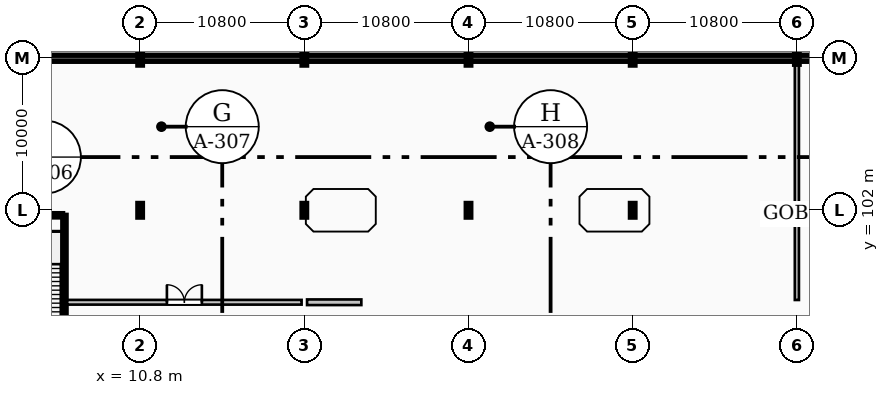
"""IFC4 building model, lengths in metres.
Left out: names, types, materials, properties, quantities, classifications, styles, units other than length and angle.
Written with IfcOpenShell. Run it as: python <this file> out.ifc"""

import sys

from ifc_helpers import new_model, si_unit, direction, frame, frame_2d, origin, origin_2d, place, context, subcontext, project, spatial, rectangle, i_section, extrude, element, fill, save


model = new_model("IFC4")
c1 = context("Model", 3, precision=1e-05, world=origin(), true_north=direction((0.0, 1.0)))
c2 = subcontext(c1, "Body", "Model", "MODEL_VIEW")
j1 = project(units=[si_unit("LENGTHUNIT", "METRE"), si_unit("PLANEANGLEUNIT", "RADIAN")], contexts=[c1])
p1 = place(None, origin())
s1 = spatial("IfcSite", under=j1, at=p1, CompositionType="ELEMENT")
p2 = place(p1, origin())
s2 = spatial("IfcBuilding", under=s1, at=p2, CompositionType="ELEMENT")
p3 = place(p2, origin())
s3 = spatial("IfcBuildingStorey", under=s2, at=p3, CompositionType="ELEMENT", Elevation=0.0)
p4 = place(p3, frame((-0.22, 112.0, 0.0), z_axis=(0.0, 0.0, 1.0), x_axis=(1.0, 0.0, 0.0)))
e1 = element("IfcWall", 1, at=p4, inside=s3, PredefinedType="USERDEFINED", context=c2, shape_type="SweptSolid", body=[
    extrude(rectangle(XDim=32.62, YDim=0.4, at=frame_2d((16.31, 0.0))), origin(), (0.0, 0.0, 1.0), 4.56),
])
p5 = place(p3, frame((32.4, 112.0, 0.0), z_axis=(0.0, 0.0, 1.0), x_axis=(1.0, 0.0, 0.0)))
e2 = element("IfcWall", 2, at=p5, inside=s3, PredefinedType="USERDEFINED", context=c2, shape_type="SweptSolid", body=[
    extrude(rectangle(XDim=32.4, YDim=0.4, at=frame_2d((16.2, 0.0))), origin(), (0.0, 0.0, 1.0), 4.56),
])
for number, where, z_axis, x_axis in (
    (3, (10.8, 102.0, 0.0), (0.0, 0.0, 1.0), (1.0, 0.0, 0.0)),
    (4, (10.8, 112.0, 0.0), (0.0, 0.0, 1.0), (1.0, 0.0, 0.0)),
    (5, (21.6, 102.0, 0.0), (0.0, 0.0, 1.0), (1.0, 0.0, 0.0)),
    (6, (21.6, 112.0, 0.0), (0.0, 0.0, 1.0), (1.0, 0.0, 0.0)),
    (7, (32.4, 102.0, 0.0), (0.0, 0.0, 1.0), (1.0, 0.0, 0.0)),
    (8, (32.4, 112.0, 0.0), (0.0, 0.0, 1.0), (1.0, 0.0, 0.0)),
    (9, (43.2, 102.0, 0.0), (0.0, 0.0, 1.0), (1.0, 0.0, 0.0)),
    (10, (43.2, 112.0, 0.0), (0.0, 0.0, 1.0), (1.0, 0.0, 0.0)),
):
    element("IfcColumn", number, at=place(p3, frame(where, z_axis=z_axis, x_axis=x_axis)), inside=s3, PredefinedType="COLUMN", context=c2, shape_type="SweptSolid", body=[
        extrude(i_section(OverallWidth=0.3, OverallDepth=0.9, WebThickness=0.019, FlangeThickness=0.035, FilletRadius=0.03, at=origin_2d()), origin(), (0.0, 0.0, 1.0), 4.8),
    ])
for number, where, z_axis, x_axis in (
    (11, (54.0, 102.0, 0.0), (0.0, 0.0, 1.0), (1.0, 0.0, 0.0)),
    (12, (54.0, 112.0, 0.0), (0.0, 0.0, 1.0), (1.0, 0.0, 0.0)),
):
    element("IfcColumn", number, at=place(p3, frame(where, z_axis=z_axis, x_axis=x_axis)), inside=s3, PredefinedType="COLUMN", context=c2, shape_type="SweptSolid", body=[
        extrude(i_section(OverallWidth=0.3, OverallDepth=0.79, WebThickness=0.015, FlangeThickness=0.028, FilletRadius=0.03, at=origin_2d()), origin(), (0.0, 0.0, 1.0), 4.8),
    ])
p6 = place(p3, frame((5.82, 92.53, 0.0), z_axis=(0.0, 0.0, 1.0), x_axis=(0.0, 1.0, 0.0)))
e13 = element("IfcWall", 13, at=p6, inside=s3, PredefinedType="SHEAR", context=c2, shape_type="SweptSolid", body=[
    extrude(rectangle(XDim=9.14, YDim=0.22, at=frame_2d((4.57, 0.0))), origin(), (0.0, 0.0, 1.0), 4.56),
])
p7 = place(p6, frame((0.67, 0.0, 0.0)))
e14 = element("IfcOpeningElement", 14, at=p7, cuts=e13, PredefinedType="OPENING", context=c2, shape_type="SweptSolid", body=[
    extrude(rectangle(XDim=1.1, YDim=2.2, at=frame_2d((0.55, 1.1))), frame((0.0, 0.12, 0.0), z_axis=(0.0, -1.0, 0.0), x_axis=(1.0, 0.0, 0.0)), (0.0, 0.0, 1.0), 0.24),
])
p8 = place(p3, frame((1.3, 101.67, 0.0), z_axis=(0.0, 0.0, 1.0), x_axis=(1.0, 0.0, 0.0)))
e15 = element("IfcWall", 15, at=p8, inside=s3, PredefinedType="SHEAR", context=c2, shape_type="SweptSolid", body=[
    extrude(rectangle(XDim=4.4, YDim=0.22, at=frame_2d((2.2, 0.0))), origin(), (0.0, 0.0, 1.0), 4.56),
])
p9 = place(p3, frame((6.0, 95.95, 0.0), z_axis=(0.0, 0.0, 1.0), x_axis=(1.0, 0.0, 0.0)))
e16 = element("IfcWall", 16, at=p9, inside=s3, PredefinedType="PARTITIONING", context=c2, shape_type="SweptSolid", body=[
    extrude(rectangle(XDim=15.42, YDim=0.31, at=frame_2d((7.71, 0.0))), origin(), (0.0, 0.0, 1.0), 4.52),
])
p10 = place(p9, frame((6.56, 0.0, 0.0)))
e17 = element("IfcOpeningElement", 17, at=p10, cuts=e16, PredefinedType="OPENING", context=c2, shape_type="SweptSolid", body=[
    extrude(rectangle(XDim=2.3, YDim=2.65, at=frame_2d((1.15, 1.325))), frame((0.0, 0.165, 0.0), z_axis=(0.0, -1.0, 0.0), x_axis=(1.0, 0.0, 0.0)), (0.0, 0.0, 1.0), 0.33),
])
p11 = place(p3, frame((21.78, 95.95, 0.0), z_axis=(0.0, 0.0, 1.0), x_axis=(1.0, 0.0, 0.0)))
e18 = element("IfcWall", 18, at=p11, inside=s3, PredefinedType="PARTITIONING", context=c2, shape_type="SweptSolid", body=[
    extrude(rectangle(XDim=3.57, YDim=0.37, at=frame_2d((1.785, 0.0))), origin(), (0.0, 0.0, 1.0), 4.52),
])
p12 = place(p3, frame((54.0, 96.1, 0.0), z_axis=(0.0, 0.0, 1.0), x_axis=(0.0, 1.0, 0.0)))
e19 = element("IfcWall", 19, at=p12, inside=s3, PredefinedType="PARTITIONING", context=c2, shape_type="SweptSolid", body=[
    extrude(rectangle(XDim=5.7, YDim=0.27, at=frame_2d((2.85, 0.0))), origin(), (0.0, 0.0, 1.0), 4.06),
])
p13 = place(p3, frame((54.0, 102.2, 0.0), z_axis=(0.0, 0.0, 1.0), x_axis=(0.0, 1.0, 0.0)))
e20 = element("IfcWall", 20, at=p13, inside=s3, PredefinedType="PARTITIONING", context=c2, shape_type="SweptSolid", body=[
    extrude(rectangle(XDim=9.62, YDim=0.27, at=frame_2d((4.81, 0.0))), origin(), (0.0, 0.0, 1.0), 4.06),
])
p14 = place(p10, origin())
e21 = element("IfcDoor", 21, at=p14, inside=s3, OperationType="DOUBLE_DOOR_SINGLE_SWING", PredefinedType="DOOR", context=c2, shape_type="SweptSolid", body=[
    extrude(rectangle(XDim=2.3, YDim=2.65, at=frame_2d((1.15, 1.325))), frame((0.0, 0.025, 0.0), z_axis=(0.0, -1.0, 0.0), x_axis=(1.0, 0.0, 0.0)), (0.0, 0.0, 1.0), 0.05),
])
fill(e17, e21)
save(model, sys.argv[1])
